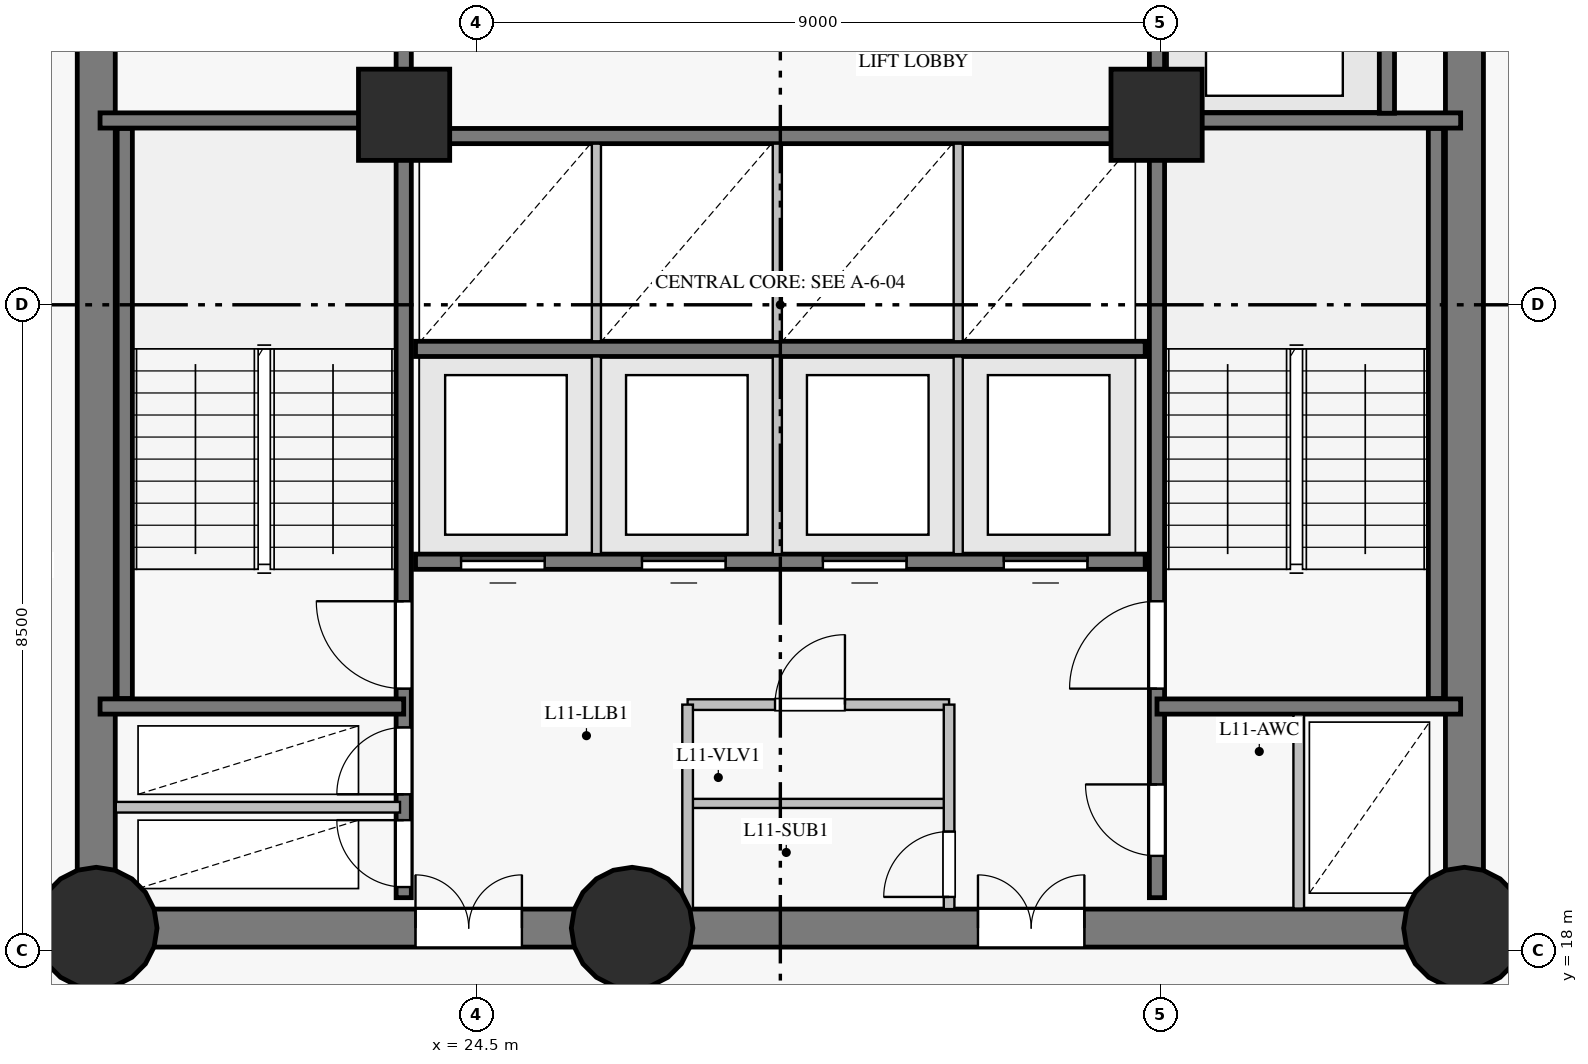
"""IFC4 building model, lengths in metres.
Left out: names, types, materials, properties, quantities, classifications, styles, units other than length and angle.
Written with IfcOpenShell. Run it as: python <this file> out.ifc"""

import sys

from ifc_helpers import new_model, si_unit, direction, frame, frame_2d, origin, origin_with_axes, origin_2d, place, context, subcontext, project, spatial, rectangle, circle, extrude, source, transform, mapped, element, fill, save


model = new_model("IFC4")
c1 = context("Model", 3, precision=1e-05, world=origin(), true_north=direction((0.0, 1.0)))
c2 = subcontext(c1, "Body", "Model", "MODEL_VIEW")
j1 = project(units=[si_unit("LENGTHUNIT", "METRE"), si_unit("PLANEANGLEUNIT", "RADIAN")], contexts=[c1])
p1 = place(None, origin())
s1 = spatial("IfcSite", under=j1, at=p1, CompositionType="ELEMENT")
p2 = place(p1, origin())
s2 = spatial("IfcBuilding", under=s1, at=p2, CompositionType="ELEMENT")
p3 = place(p2, frame((0.0, 0.0, 44.5)))
s3 = spatial("IfcBuildingStorey", under=s2, at=p3, CompositionType="ELEMENT", Elevation=44.5)
p4 = place(p3, frame((19.5, 18.3, 0.0), z_axis=(0.0, 0.0, 1.0), x_axis=(1.0, 0.0, 0.0)))
e1 = element("IfcWall", 1, at=p4, inside=s3, PredefinedType="SHEAR", context=c2, shape_type="SweptSolid", body=[
    extrude(rectangle(XDim=7.05, YDim=0.5, at=frame_2d((3.525, 0.0))), origin(), (0.0, 0.0, 1.0), 3.35),
])
p5 = place(p4, frame((4.2, 0.0, 0.0)))
e2 = element("IfcOpeningElement", 2, at=p5, cuts=e1, PredefinedType="OPENING", context=c2, shape_type="SweptSolid", body=[
    extrude(rectangle(XDim=1.4, YDim=2.2, at=frame_2d((0.7, 1.1))), frame((0.0, 0.26, 0.0), z_axis=(0.0, -1.0, 0.0), x_axis=(1.0, 0.0, 0.0)), (0.0, 0.0, 1.0), 0.52),
])
p6 = place(p3, frame((26.55, 18.3, 0.0), z_axis=(0.0, 0.0, 1.0), x_axis=(1.0, 0.0, 0.0)))
e3 = element("IfcWall", 3, at=p6, inside=s3, PredefinedType="SHEAR", context=c2, shape_type="SweptSolid", body=[
    extrude(rectangle(XDim=10.95, YDim=0.5, at=frame_2d((5.475, 0.0))), origin(), (0.0, 0.0, 1.0), 3.35),
])
p7 = place(p6, frame((4.55, 0.0, 0.0)))
e4 = element("IfcOpeningElement", 4, at=p7, cuts=e3, PredefinedType="OPENING", context=c2, shape_type="SweptSolid", body=[
    extrude(rectangle(XDim=1.4, YDim=2.2, at=frame_2d((0.7, 1.1))), frame((0.0, 0.26, 0.0), z_axis=(0.0, -1.0, 0.0), x_axis=(1.0, 0.0, 0.0)), (0.0, 0.0, 1.0), 0.52),
])
p8 = place(p3, frame((37.5, 18.3, 0.0), z_axis=(0.0, 0.0, 1.0), x_axis=(0.0, 1.0, 0.0)))
e5 = element("IfcWall", 5, at=p8, inside=s3, PredefinedType="SHEAR", context=c2, shape_type="SweptSolid", body=[
    extrude(rectangle(XDim=16.4, YDim=0.5, at=frame_2d((8.2, 0.0))), origin(), (0.0, 0.0, 1.0), 3.35),
])
p9 = place(p8, frame((14.06, 0.0, 0.0)))
e6 = element("IfcOpeningElement", 6, at=p9, cuts=e5, PredefinedType="OPENING", context=c2, shape_type="SweptSolid", body=[
    extrude(rectangle(XDim=1.2, YDim=2.15, at=frame_2d((0.6, 1.075))), frame((0.0, 0.26, 0.0), z_axis=(0.0, -1.0, 0.0), x_axis=(1.0, 0.0, 0.0)), (0.0, 0.0, 1.0), 0.52),
])
p10 = place(p3, frame((19.5, 34.7, 0.0), z_axis=(0.0, 0.0, 1.0), x_axis=(0.0, -1.0, 0.0)))
e7 = element("IfcWall", 7, at=p10, inside=s3, PredefinedType="SHEAR", context=c2, shape_type="SweptSolid", body=[
    extrude(rectangle(XDim=16.4, YDim=0.5, at=frame_2d((8.2, 0.0))), origin(), (0.0, 0.0, 1.0), 3.35),
])
p11 = place(p10, frame((3.1, 0.0, 0.0)))
e8 = element("IfcOpeningElement", 8, at=p11, cuts=e7, PredefinedType="OPENING", context=c2, shape_type="SweptSolid", body=[
    extrude(rectangle(XDim=1.1, YDim=2.15, at=frame_2d((0.55, 1.075))), frame((0.0, 0.26, 0.0), z_axis=(0.0, -1.0, 0.0), x_axis=(1.0, 0.0, 0.0)), (0.0, 0.0, 1.0), 0.52),
])
m1 = source(origin_with_axes(), c2, "Body", "SweptSolid", [
    extrude(circle(Radius=0.8, at=origin_2d()), origin(), (0.0, 0.0, 1.0), 3.6),
])
for number, where, z_axis, x_axis in (
    (9, (19.5, 18.3, 0.0), (0.0, 0.0, 1.0), (1.0, 0.0, 0.0)),
    (10, (26.55, 18.3, 0.0), (0.0, 0.0, 1.0), (1.0, 0.0, 0.0)),
    (11, (37.5, 18.3, 0.0), (0.0, 0.0, 1.0), (1.0, 0.0, 0.0)),
):
    element("IfcColumn", number, at=place(p3, frame(where, z_axis=z_axis, x_axis=x_axis)), inside=s3, PredefinedType="COLUMN", context=c2, shape_type="MappedRepresentation", body=[
        mapped(m1, transform((0.0, 0.0, 0.0), scale=1.0)),
    ])
m2 = source(origin_with_axes(), c2, "Body", "SweptSolid", [
    extrude(rectangle(XDim=1.2, YDim=1.2, at=origin_2d()), origin(), (0.0, 0.0, 1.0), 3.6),
])
for number, where, z_axis, x_axis in (
    (12, (23.55, 29.0, 0.0), (0.0, 0.0, 1.0), (1.0, 0.0, 0.0)),
    (13, (33.45, 29.0, 0.0), (0.0, 0.0, 1.0), (1.0, 0.0, 0.0)),
):
    element("IfcColumn", number, at=place(p3, frame(where, z_axis=z_axis, x_axis=x_axis)), inside=s3, PredefinedType="COLUMN", context=c2, shape_type="MappedRepresentation", body=[
        mapped(m2, transform((0.0, 0.0, 0.0), scale=1.0)),
    ])
p12 = place(p3, frame((23.545, 18.7, 0.0), z_axis=(0.0, 0.0, 1.0), x_axis=(0.0, 1.0, 0.0)))
e14 = element("IfcWall", 14, at=p12, inside=s3, PredefinedType="SHEAR", context=c2, shape_type="SweptSolid", body=[
    extrude(rectangle(XDim=15.6, YDim=0.2, at=frame_2d((7.8, 0.0))), origin(), (0.0, 0.0, 1.0), 3.35),
])
p13 = place(p12, frame((2.75, 0.0, 0.0)))
e15 = element("IfcOpeningElement", 15, at=p13, cuts=e14, PredefinedType="OPENING", context=c2, shape_type="SweptSolid", body=[
    extrude(rectangle(XDim=1.15, YDim=2.15, at=frame_2d((0.575, 1.075))), frame((0.0, 0.11, 0.0), z_axis=(0.0, -1.0, 0.0), x_axis=(1.0, 0.0, 0.0)), (0.0, 0.0, 1.0), 0.22),
])
p14 = place(p12, frame((0.14, 0.0, 0.0)))
e16 = element("IfcOpeningElement", 16, at=p14, cuts=e14, PredefinedType="OPENING", context=c2, shape_type="SweptSolid", body=[
    extrude(rectangle(XDim=0.88, YDim=2.1, at=frame_2d((0.44, 1.05))), frame((0.0, 0.11, 0.0), z_axis=(0.0, -1.0, 0.0), x_axis=(1.0, 0.0, 0.0)), (0.0, 0.0, 1.0), 0.22),
])
p15 = place(p12, frame((1.36, 0.0, 0.0)))
e17 = element("IfcOpeningElement", 17, at=p15, cuts=e14, PredefinedType="OPENING", context=c2, shape_type="SweptSolid", body=[
    extrude(rectangle(XDim=0.88, YDim=2.1, at=frame_2d((0.44, 1.05))), frame((0.0, 0.11, 0.0), z_axis=(0.0, -1.0, 0.0), x_axis=(1.0, 0.0, 0.0)), (0.0, 0.0, 1.0), 0.22),
])
p16 = place(p12, frame((12.1, 0.0, 0.0)))
e18 = element("IfcOpeningElement", 18, at=p16, cuts=e14, PredefinedType="OPENING", context=c2, shape_type="SweptSolid", body=[
    extrude(rectangle(XDim=1.12, YDim=2.15, at=frame_2d((0.56, 1.075))), frame((0.0, 0.11, 0.0), z_axis=(0.0, -1.0, 0.0), x_axis=(1.0, 0.0, 0.0)), (0.0, 0.0, 1.0), 0.22),
])
p17 = place(p12, frame((14.05, 0.0, 0.0)))
e19 = element("IfcOpeningElement", 19, at=p17, cuts=e14, PredefinedType="OPENING", context=c2, shape_type="SweptSolid", body=[
    extrude(rectangle(XDim=1.12, YDim=2.15, at=frame_2d((0.56, 1.075))), frame((0.0, 0.11, 0.0), z_axis=(0.0, -1.0, 0.0), x_axis=(1.0, 0.0, 0.0)), (0.0, 0.0, 1.0), 0.22),
])
p18 = place(p3, frame((33.455, 18.7, 0.0), z_axis=(0.0, 0.0, 1.0), x_axis=(0.0, 1.0, 0.0)))
e20 = element("IfcWall", 20, at=p18, inside=s3, PredefinedType="SHEAR", context=c2, shape_type="SweptSolid", body=[
    extrude(rectangle(XDim=15.6, YDim=0.2, at=frame_2d((7.8, 0.0))), origin(), (0.0, 0.0, 1.0), 3.35),
])
p19 = place(p18, frame((2.75, 0.0, 0.0)))
e21 = element("IfcOpeningElement", 21, at=p19, cuts=e20, PredefinedType="OPENING", context=c2, shape_type="SweptSolid", body=[
    extrude(rectangle(XDim=1.15, YDim=2.15, at=frame_2d((0.575, 1.075))), frame((0.0, 0.11, 0.0), z_axis=(0.0, -1.0, 0.0), x_axis=(1.0, 0.0, 0.0)), (0.0, 0.0, 1.0), 0.22),
])
p20 = place(p18, frame((0.55, 0.0, 0.0)))
e22 = element("IfcOpeningElement", 22, at=p20, cuts=e20, PredefinedType="OPENING", context=c2, shape_type="SweptSolid", body=[
    extrude(rectangle(XDim=0.94, YDim=2.1, at=frame_2d((0.47, 1.05))), frame((0.0, 0.11, 0.0), z_axis=(0.0, -1.0, 0.0), x_axis=(1.0, 0.0, 0.0)), (0.0, 0.0, 1.0), 0.22),
])
p21 = place(p3, frame((23.7, 23.12, 0.0), z_axis=(0.0, 0.0, 1.0), x_axis=(1.0, 0.0, 0.0)))
e23 = element("IfcWall", 23, at=p21, inside=s3, PredefinedType="SHEAR", context=c2, shape_type="SweptSolid", body=[
    extrude(rectangle(XDim=9.6, YDim=0.2, at=frame_2d((4.8, 0.0))), origin(), (0.0, 0.0, 1.0), 3.35),
])
p22 = place(p21, frame((0.6, 0.0, 0.0)))
e24 = element("IfcOpeningElement", 24, at=p22, cuts=e23, PredefinedType="OPENING", context=c2, shape_type="SweptSolid", body=[
    extrude(rectangle(XDim=1.1, YDim=2.15, at=frame_2d((0.55, 1.075))), frame((0.0, 0.11, 0.0), z_axis=(0.0, -1.0, 0.0), x_axis=(1.0, 0.0, 0.0)), (0.0, 0.0, 1.0), 0.22),
])
p23 = place(p21, frame((2.98, 0.0, 0.0)))
e25 = element("IfcOpeningElement", 25, at=p23, cuts=e23, PredefinedType="OPENING", context=c2, shape_type="SweptSolid", body=[
    extrude(rectangle(XDim=1.1, YDim=2.15, at=frame_2d((0.55, 1.075))), frame((0.0, 0.11, 0.0), z_axis=(0.0, -1.0, 0.0), x_axis=(1.0, 0.0, 0.0)), (0.0, 0.0, 1.0), 0.22),
])
p24 = place(p21, frame((5.36, 0.0, 0.0)))
e26 = element("IfcOpeningElement", 26, at=p24, cuts=e23, PredefinedType="OPENING", context=c2, shape_type="SweptSolid", body=[
    extrude(rectangle(XDim=1.1, YDim=2.15, at=frame_2d((0.55, 1.075))), frame((0.0, 0.11, 0.0), z_axis=(0.0, -1.0, 0.0), x_axis=(1.0, 0.0, 0.0)), (0.0, 0.0, 1.0), 0.22),
])
p25 = place(p21, frame((7.74, 0.0, 0.0)))
e27 = element("IfcOpeningElement", 27, at=p25, cuts=e23, PredefinedType="OPENING", context=c2, shape_type="SweptSolid", body=[
    extrude(rectangle(XDim=1.1, YDim=2.15, at=frame_2d((0.55, 1.075))), frame((0.0, 0.11, 0.0), z_axis=(0.0, -1.0, 0.0), x_axis=(1.0, 0.0, 0.0)), (0.0, 0.0, 1.0), 0.22),
])
for number, where, z_axis, x_axis in (
    (28, (23.7, 25.92, 0.0), (0.0, 0.0, 1.0), (1.0, 0.0, 0.0)),
    (29, (23.7, 28.72, 0.0), (0.0, 0.0, 1.0), (1.0, 0.0, 0.0)),
):
    element("IfcWall", number, at=place(p3, frame(where, z_axis=z_axis, x_axis=x_axis)), inside=s3, PredefinedType="SHEAR", context=c2, shape_type="SweptSolid", body=[
        extrude(rectangle(XDim=9.6, YDim=0.2, at=frame_2d((4.8, 0.0))), origin(), (0.0, 0.0, 1.0), 3.35),
    ])
for number, where, z_axis, x_axis in (
    (30, (19.875, 21.32, 0.0), (0.0, 0.0, 1.0), (0.0, 1.0, 0.0)),
    (31, (37.125, 21.32, 0.0), (0.0, 0.0, 1.0), (0.0, 1.0, 0.0)),
):
    element("IfcWall", number, at=place(p3, frame(where, z_axis=z_axis, x_axis=x_axis)), inside=s3, PredefinedType="SHEAR", context=c2, shape_type="SweptSolid", body=[
        extrude(rectangle(XDim=7.5, YDim=0.2, at=frame_2d((3.75, 0.0))), origin(), (0.0, 0.0, 1.0), 3.35),
    ])
for number, where, z_axis, x_axis in (
    (32, (33.455, 21.215, 0.0), (0.0, 0.0, 1.0), (1.0, 0.0, 0.0)),
    (33, (33.455, 28.925, 0.0), (0.0, 0.0, 1.0), (1.0, 0.0, 0.0)),
    (34, (19.55, 21.215, 0.0), (0.0, 0.0, 1.0), (1.0, 0.0, 0.0)),
    (35, (19.55, 28.925, 0.0), (0.0, 0.0, 1.0), (1.0, 0.0, 0.0)),
):
    element("IfcWall", number, at=place(p3, frame(where, z_axis=z_axis, x_axis=x_axis)), inside=s3, PredefinedType="SHEAR", context=c2, shape_type="SweptSolid", body=[
        extrude(rectangle(XDim=3.995, YDim=0.2, at=frame_2d((1.998, 0.0))), origin(), (0.0, 0.0, 1.0), 3.35),
    ])
p26 = place(p3, frame((36.48, 29.02, 0.0), z_axis=(0.0, 0.0, 1.0), x_axis=(0.0, 1.0, 0.0)))
e36 = element("IfcWall", 36, at=p26, inside=s3, PredefinedType="SHEAR", context=c2, shape_type="SweptSolid", body=[
    extrude(rectangle(XDim=2.86, YDim=0.2, at=frame_2d((1.43, 0.0))), origin(), (0.0, 0.0, 1.0), 3.35),
])
p27 = place(p3, frame((19.757, 19.89, 0.0), z_axis=(0.0, 0.0, 1.0), x_axis=(1.0, 0.0, 0.0)))
e37 = element("IfcWall", 37, at=p27, inside=s3, PredefinedType="PARTITIONING", context=c2, shape_type="SweptSolid", body=[
    extrude(rectangle(XDim=3.739, YDim=0.14, at=frame_2d((1.87, 0.0))), origin(), (0.0, 0.0, 1.0), 3.35),
])
p28 = place(p3, frame((27.28, 21.24, 0.0), z_axis=(0.0, 0.0, 1.0), x_axis=(1.0, 0.0, 0.0)))
e38 = element("IfcWall", 38, at=p28, inside=s3, PredefinedType="PARTITIONING", context=c2, shape_type="SweptSolid", body=[
    extrude(rectangle(XDim=3.44, YDim=0.14, at=frame_2d((1.72, 0.0))), origin(), (0.0, 0.0, 1.0), 3.35),
])
p29 = place(p28, frame((1.15, 0.0, 0.0)))
e39 = element("IfcOpeningElement", 39, at=p29, cuts=e38, PredefinedType="OPENING", context=c2, shape_type="SweptSolid", body=[
    extrude(rectangle(XDim=0.92, YDim=2.1, at=frame_2d((0.46, 1.05))), frame((0.0, 0.08, 0.0), z_axis=(0.0, -1.0, 0.0), x_axis=(1.0, 0.0, 0.0)), (0.0, 0.0, 1.0), 0.16),
])
p30 = place(p3, frame((27.28, 19.94, 0.0), z_axis=(0.0, 0.0, 1.0), x_axis=(1.0, 0.0, 0.0)))
e40 = element("IfcWall", 40, at=p30, inside=s3, PredefinedType="PARTITIONING", context=c2, shape_type="SweptSolid", body=[
    extrude(rectangle(XDim=3.44, YDim=0.12, at=frame_2d((1.72, 0.0))), origin(), (0.0, 0.0, 1.0), 3.35),
])
p31 = place(p3, frame((27.28, 18.55, 0.0), z_axis=(0.0, 0.0, 1.0), x_axis=(0.0, 1.0, 0.0)))
e41 = element("IfcWall", 41, at=p31, inside=s3, PredefinedType="PARTITIONING", context=c2, shape_type="SweptSolid", body=[
    extrude(rectangle(XDim=2.69, YDim=0.14, at=frame_2d((1.345, 0.0))), origin(), (0.0, 0.0, 1.0), 3.35),
])
p32 = place(p3, frame((30.72, 18.55, 0.0), z_axis=(0.0, 0.0, 1.0), x_axis=(0.0, 1.0, 0.0)))
e42 = element("IfcWall", 42, at=p32, inside=s3, PredefinedType="PARTITIONING", context=c2, shape_type="SweptSolid", body=[
    extrude(rectangle(XDim=2.69, YDim=0.14, at=frame_2d((1.345, 0.0))), origin(), (0.0, 0.0, 1.0), 3.35),
])
p33 = place(p32, frame((0.16, 0.0, 0.0)))
e43 = element("IfcOpeningElement", 43, at=p33, cuts=e42, PredefinedType="OPENING", context=c2, shape_type="SweptSolid", body=[
    extrude(rectangle(XDim=0.86, YDim=2.1, at=frame_2d((0.43, 1.05))), frame((0.0, 0.08, 0.0), z_axis=(0.0, -1.0, 0.0), x_axis=(1.0, 0.0, 0.0)), (0.0, 0.0, 1.0), 0.16),
])
for number, where, z_axis, x_axis in (
    (44, (26.08, 23.22, 0.0), (0.0, 0.0, 1.0), (0.0, 1.0, 0.0)),
    (45, (28.46, 23.22, 0.0), (0.0, 0.0, 1.0), (0.0, 1.0, 0.0)),
    (46, (30.84, 23.22, 0.0), (0.0, 0.0, 1.0), (0.0, 1.0, 0.0)),
    (47, (26.08, 26.02, 0.0), (0.0, 0.0, 1.0), (0.0, 1.0, 0.0)),
    (48, (28.46, 26.02, 0.0), (0.0, 0.0, 1.0), (0.0, 1.0, 0.0)),
    (49, (30.84, 26.02, 0.0), (0.0, 0.0, 1.0), (0.0, 1.0, 0.0)),
):
    element("IfcWall", number, at=place(p3, frame(where, z_axis=z_axis, x_axis=x_axis)), inside=s3, PredefinedType="PARTITIONING", context=c2, shape_type="SweptSolid", body=[
        extrude(rectangle(XDim=2.6, YDim=0.12, at=frame_2d((1.3, 0.0))), origin(), (0.0, 0.0, 1.0), 3.35),
    ])
p34 = place(p3, frame((35.32, 18.557, 0.0), z_axis=(0.0, 0.0, 1.0), x_axis=(0.0, 1.0, 0.0)))
e50 = element("IfcWall", 50, at=p34, inside=s3, PredefinedType="PARTITIONING", context=c2, shape_type="SweptSolid", body=[
    extrude(rectangle(XDim=2.553, YDim=0.14, at=frame_2d((1.277, 0.0))), origin(), (0.0, 0.0, 1.0), 3.35),
])
m3 = source(origin_with_axes(), c2, "Body", "SweptSolid", [
    extrude(rectangle(XDim=1.15, YDim=2.15, at=frame_2d((0.575, 1.075))), frame((0.0, 0.025, 0.0), z_axis=(0.0, -1.0, 0.0), x_axis=(1.0, 0.0, 0.0)), (0.0, 0.0, 1.0), 0.05),
])
p35 = place(p13, origin())
e51 = element("IfcDoor", 51, at=p35, inside=s3, OperationType="SINGLE_SWING_RIGHT", PredefinedType="DOOR", context=c2, shape_type="MappedRepresentation", body=[
    mapped(m3, transform((0.0, 0.0, 0.0), scale=1.0)),
])
fill(e15, e51)
p36 = place(p19, origin())
e52 = element("IfcDoor", 52, at=p36, inside=s3, OperationType="SINGLE_SWING_LEFT", PredefinedType="DOOR", context=c2, shape_type="MappedRepresentation", body=[
    mapped(m3, transform((0.0, 0.0, 0.0), scale=1.0)),
])
fill(e21, e52)
m4 = source(origin_with_axes(), c2, "Body", "SweptSolid", [
    extrude(rectangle(XDim=0.88, YDim=2.1, at=frame_2d((0.44, 1.05))), frame((0.0, 0.025, 0.0), z_axis=(0.0, -1.0, 0.0), x_axis=(1.0, 0.0, 0.0)), (0.0, 0.0, 1.0), 0.05),
])
p37 = place(p14, origin())
e53 = element("IfcDoor", 53, at=p37, inside=s3, OperationType="SINGLE_SWING_RIGHT", PredefinedType="DOOR", context=c2, shape_type="MappedRepresentation", body=[
    mapped(m4, transform((0.0, 0.0, 0.0), scale=1.0)),
])
fill(e16, e53)
p38 = place(p15, origin())
e54 = element("IfcDoor", 54, at=p38, inside=s3, OperationType="SINGLE_SWING_LEFT", PredefinedType="DOOR", context=c2, shape_type="MappedRepresentation", body=[
    mapped(m4, transform((0.0, 0.0, 0.0), scale=1.0)),
])
fill(e17, e54)
m5 = source(origin_with_axes(), c2, "Body", "SweptSolid", [
    extrude(rectangle(XDim=1.4, YDim=2.2, at=frame_2d((0.7, 1.1))), frame((0.0, 0.025, 0.0), z_axis=(0.0, -1.0, 0.0), x_axis=(1.0, 0.0, 0.0)), (0.0, 0.0, 1.0), 0.05),
])
p39 = place(p5, origin())
e55 = element("IfcDoor", 55, at=p39, inside=s3, OperationType="DOUBLE_DOOR_SINGLE_SWING", PredefinedType="DOOR", context=c2, shape_type="MappedRepresentation", body=[
    mapped(m5, transform((0.0, 0.0, 0.0), scale=1.0)),
])
fill(e2, e55)
p40 = place(p7, origin())
e56 = element("IfcDoor", 56, at=p40, inside=s3, OperationType="DOUBLE_DOOR_SINGLE_SWING", PredefinedType="DOOR", context=c2, shape_type="MappedRepresentation", body=[
    mapped(m5, transform((0.0, 0.0, 0.0), scale=1.0)),
])
fill(e4, e56)
m6 = source(origin_with_axes(), c2, "Body", "SweptSolid", [
    extrude(rectangle(XDim=0.94, YDim=2.1, at=frame_2d((0.47, 1.05))), frame((0.0, 0.025, 0.0), z_axis=(0.0, -1.0, 0.0), x_axis=(1.0, 0.0, 0.0)), (0.0, 0.0, 1.0), 0.05),
])
p41 = place(p20, origin())
e57 = element("IfcDoor", 57, at=p41, inside=s3, OperationType="SINGLE_SWING_RIGHT", PredefinedType="DOOR", context=c2, shape_type="MappedRepresentation", body=[
    mapped(m6, transform((0.0, 0.0, 0.0), scale=1.0)),
])
fill(e22, e57)
m7 = source(origin_with_axes(), c2, "Body", "SweptSolid", [
    extrude(rectangle(XDim=0.86, YDim=2.1, at=frame_2d((0.43, 1.05))), frame((0.0, 0.025, 0.0), z_axis=(0.0, -1.0, 0.0), x_axis=(1.0, 0.0, 0.0)), (0.0, 0.0, 1.0), 0.05),
])
p42 = place(p33, origin())
e58 = element("IfcDoor", 58, at=p42, inside=s3, OperationType="SINGLE_SWING_LEFT", PredefinedType="DOOR", context=c2, shape_type="MappedRepresentation", body=[
    mapped(m7, transform((0.0, 0.0, 0.0), scale=1.0)),
])
fill(e43, e58)
m8 = source(origin_with_axes(), c2, "Body", "SweptSolid", [
    extrude(rectangle(XDim=0.92, YDim=2.1, at=frame_2d((0.46, 1.05))), frame((0.0, 0.025, 0.0), z_axis=(0.0, -1.0, 0.0), x_axis=(1.0, 0.0, 0.0)), (0.0, 0.0, 1.0), 0.05),
])
p43 = place(p29, origin())
e59 = element("IfcDoor", 59, at=p43, inside=s3, OperationType="SINGLE_SWING_RIGHT", PredefinedType="DOOR", context=c2, shape_type="MappedRepresentation", body=[
    mapped(m8, transform((0.0, 0.0, 0.0), scale=1.0)),
])
fill(e39, e59)
m9 = source(origin_with_axes(), c2, "Body", "SweptSolid", [
    extrude(rectangle(XDim=1.1, YDim=2.15, at=frame_2d((0.55, 1.075))), frame((0.0, 0.025, 0.0), z_axis=(0.0, -1.0, 0.0), x_axis=(1.0, 0.0, 0.0)), (0.0, 0.0, 1.0), 0.05),
])
p44 = place(p22, origin())
e60 = element("IfcDoor", 60, at=p44, inside=s3, OperationType="SLIDING_TO_LEFT", PredefinedType="DOOR", context=c2, shape_type="MappedRepresentation", body=[
    mapped(m9, transform((0.0, 0.0, 0.0), scale=1.0)),
])
fill(e24, e60)
p45 = place(p23, origin())
e61 = element("IfcDoor", 61, at=p45, inside=s3, OperationType="SLIDING_TO_RIGHT", PredefinedType="DOOR", context=c2, shape_type="MappedRepresentation", body=[
    mapped(m9, transform((0.0, 0.0, 0.0), scale=1.0)),
])
fill(e25, e61)
p46 = place(p24, origin())
e62 = element("IfcDoor", 62, at=p46, inside=s3, OperationType="SLIDING_TO_LEFT", PredefinedType="DOOR", context=c2, shape_type="MappedRepresentation", body=[
    mapped(m9, transform((0.0, 0.0, 0.0), scale=1.0)),
])
fill(e26, e62)
p47 = place(p25, origin())
e63 = element("IfcDoor", 63, at=p47, inside=s3, OperationType="SLIDING_TO_RIGHT", PredefinedType="DOOR", context=c2, shape_type="MappedRepresentation", body=[
    mapped(m9, transform((0.0, 0.0, 0.0), scale=1.0)),
])
fill(e27, e63)
save(model, sys.argv[1])
